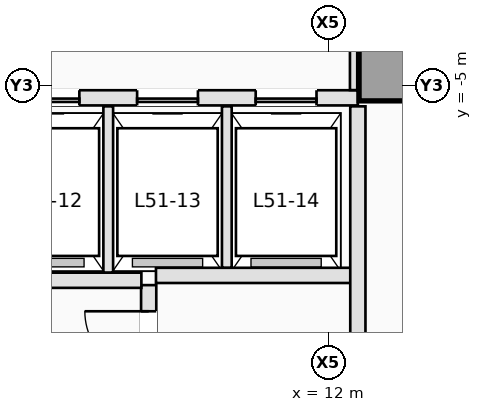
"""IFC4 building model, lengths in metres.
Left out: names, types, materials, properties, quantities, classifications, styles, units other than length and angle.
Written with IfcOpenShell. Run it as: python <this file> out.ifc"""

import sys

from ifc_helpers import new_model, si_unit, direction, frame, frame_2d, origin, origin_2d, place, context, subcontext, project, spatial, rectangle, extrude, element, fill, save


model = new_model("IFC4")
c1 = context("Model", 3, precision=1e-05, world=origin(), true_north=direction((0.0, 1.0)))
c2 = subcontext(c1, "Body", "Model", "MODEL_VIEW")
j1 = project(units=[si_unit("LENGTHUNIT", "METRE"), si_unit("PLANEANGLEUNIT", "RADIAN")], contexts=[c1])
p1 = place(None, origin())
s1 = spatial("IfcSite", under=j1, at=p1, CompositionType="ELEMENT")
p2 = place(p1, origin())
s2 = spatial("IfcBuilding", under=s1, at=p2, CompositionType="ELEMENT")
p3 = place(p2, frame((0.0, 0.0, 186.9)))
s3 = spatial("IfcBuildingStorey", under=s2, at=p3, CompositionType="ELEMENT", Elevation=186.9)
p4 = place(p3, frame((12.95, -4.8, 0.0), z_axis=(0.0, 0.0, 1.0), x_axis=(1.0, 0.0, 0.0)))
e1 = element("IfcColumn", 1, at=p4, inside=s3, PredefinedType="COLUMN", context=c2, shape_type="SweptSolid", body=[
    extrude(rectangle(XDim=0.9, YDim=0.9, at=origin_2d()), origin(), (0.0, 0.0, 1.0), 3.5),
])
p5 = place(p3, frame((9.04, -10.18, 0.0), z_axis=(0.0, 0.0, 1.0), x_axis=(0.0, 1.0, 0.0)))
e2 = element("IfcWall", 2, at=p5, inside=s3, PredefinedType="PARTITIONING", context=c2, shape_type="SweptSolid", body=[
    extrude(rectangle(XDim=1.9, YDim=0.25, at=frame_2d((0.95, 0.0))), origin(), (0.0, 0.0, 1.0), 3.25),
])
p6 = place(p5, frame((0.42, 0.0, 0.0)))
e3 = element("IfcOpeningElement", 3, at=p6, cuts=e2, PredefinedType="OPENING", context=c2, shape_type="SweptSolid", body=[
    extrude(rectangle(XDim=1.05, YDim=2.15, at=frame_2d((0.525, 1.075))), frame((0.0, 0.135, 0.0), z_axis=(0.0, -1.0, 0.0), x_axis=(1.0, 0.0, 0.0)), (0.0, 0.0, 1.0), 0.27),
])
p7 = place(p3, frame((9.16, -8.12, 0.0), z_axis=(0.0, 0.0, 1.0), x_axis=(1.0, 0.0, 0.0)))
e4 = element("IfcWall", 4, at=p7, inside=s3, PredefinedType="PARTITIONING", context=c2, shape_type="SweptSolid", body=[
    extrude(rectangle(XDim=3.22, YDim=0.25, at=frame_2d((1.61, 0.0))), origin(), (0.0, 0.0, 1.0), 3.25),
])
p8 = place(p3, frame((12.48, -10.18, 0.0), z_axis=(0.0, 0.0, 1.0), x_axis=(0.0, 1.0, 0.0)))
e5 = element("IfcWall", 5, at=p8, inside=s3, PredefinedType="PARTITIONING", context=c2, shape_type="SweptSolid", body=[
    extrude(rectangle(XDim=4.84, YDim=0.25, at=frame_2d((2.42, 0.0))), origin(), (0.0, 0.0, 1.0), 3.25),
])
p9 = place(p3, frame((3.68, -8.2, 0.0), z_axis=(0.0, 0.0, 1.0), x_axis=(1.0, 0.0, 0.0)))
e6 = element("IfcWall", 6, at=p9, inside=s3, PredefinedType="PARTITIONING", context=c2, shape_type="SweptSolid", body=[
    extrude(rectangle(XDim=5.24, YDim=0.25, at=frame_2d((2.62, 0.0))), origin(), (0.0, 0.0, 1.0), 3.25),
])
p10 = place(p3, frame((4.202, -5.2, 0.0), z_axis=(0.0, 0.0, 1.0), x_axis=(1.0, 0.0, 0.0)))
e7 = element("IfcWall", 7, at=p10, inside=s3, PredefinedType="PARTITIONING", context=c2, shape_type="SweptSolid", body=[
    extrude(rectangle(XDim=8.278, YDim=0.25, at=frame_2d((4.139, 0.0))), origin(), (0.0, 0.0, 1.0), 3.25),
])
p11 = place(p10, frame((0.748, 0.0, 0.0)))
e8 = element("IfcOpeningElement", 8, at=p11, cuts=e7, PredefinedType="OPENING", context=c2, shape_type="SweptSolid", body=[
    extrude(rectangle(XDim=1.0, YDim=2.15, at=frame_2d((0.5, 1.075))), frame((0.0, 0.135, 0.0), z_axis=(0.0, -1.0, 0.0), x_axis=(1.0, 0.0, 0.0)), (0.0, 0.0, 1.0), 0.27),
])
p12 = place(p10, frame((2.698, 0.0, 0.0)))
e9 = element("IfcOpeningElement", 9, at=p12, cuts=e7, PredefinedType="OPENING", context=c2, shape_type="SweptSolid", body=[
    extrude(rectangle(XDim=1.0, YDim=2.15, at=frame_2d((0.5, 1.075))), frame((0.0, 0.135, 0.0), z_axis=(0.0, -1.0, 0.0), x_axis=(1.0, 0.0, 0.0)), (0.0, 0.0, 1.0), 0.27),
])
p13 = place(p10, frame((4.648, 0.0, 0.0)))
e10 = element("IfcOpeningElement", 10, at=p13, cuts=e7, PredefinedType="OPENING", context=c2, shape_type="SweptSolid", body=[
    extrude(rectangle(XDim=1.0, YDim=2.15, at=frame_2d((0.5, 1.075))), frame((0.0, 0.135, 0.0), z_axis=(0.0, -1.0, 0.0), x_axis=(1.0, 0.0, 0.0)), (0.0, 0.0, 1.0), 0.27),
])
p14 = place(p10, frame((6.598, 0.0, 0.0)))
e11 = element("IfcOpeningElement", 11, at=p14, cuts=e7, PredefinedType="OPENING", context=c2, shape_type="SweptSolid", body=[
    extrude(rectangle(XDim=1.0, YDim=2.15, at=frame_2d((0.5, 1.075))), frame((0.0, 0.135, 0.0), z_axis=(0.0, -1.0, 0.0), x_axis=(1.0, 0.0, 0.0)), (0.0, 0.0, 1.0), 0.27),
])
p15 = place(p3, frame((8.375, -8.073, 0.0), z_axis=(0.0, 0.0, 1.0), x_axis=(0.0, 1.0, 0.0)))
e12 = element("IfcWall", 12, at=p15, inside=s3, PredefinedType="PARTITIONING", context=c2, shape_type="SweptSolid", body=[
    extrude(rectangle(XDim=2.733, YDim=0.16, at=frame_2d((1.366, 0.0))), origin(), (0.0, 0.0, 1.0), 3.25),
])
p16 = place(p3, frame((10.325, -7.993, 0.0), z_axis=(0.0, 0.0, 1.0), x_axis=(0.0, 1.0, 0.0)))
e13 = element("IfcWall", 13, at=p16, inside=s3, PredefinedType="PARTITIONING", context=c2, shape_type="SweptSolid", body=[
    extrude(rectangle(XDim=2.653, YDim=0.16, at=frame_2d((1.326, 0.0))), origin(), (0.0, 0.0, 1.0), 3.25),
])
p17 = place(p3, frame((12.41, -2.462, 0.0), z_axis=(0.0, 0.0, 1.0), x_axis=(0.0, -1.0, 0.0)))
e14 = element("IfcWall", 14, at=p17, inside=s3, PredefinedType="PARTITIONING", context=c2, shape_type="SweptSolid", body=[
    extrude(rectangle(XDim=2.611, YDim=0.12, at=frame_2d((1.306, 0.0))), origin(), (0.0, 0.0, 1.0), 3.25),
])
p18 = place(p12, origin())
e15 = element("IfcDoor", 15, at=p18, inside=s3, OperationType="SLIDING_TO_RIGHT", PredefinedType="DOOR", context=c2, shape_type="SweptSolid", body=[
    extrude(rectangle(XDim=1.0, YDim=2.15, at=frame_2d((0.5, 1.075))), frame((0.0, 0.025, 0.0), z_axis=(0.0, -1.0, 0.0), x_axis=(1.0, 0.0, 0.0)), (0.0, 0.0, 1.0), 0.05),
])
fill(e9, e15)
p19 = place(p13, origin())
e16 = element("IfcDoor", 16, at=p19, inside=s3, OperationType="SLIDING_TO_RIGHT", PredefinedType="DOOR", context=c2, shape_type="SweptSolid", body=[
    extrude(rectangle(XDim=1.0, YDim=2.15, at=frame_2d((0.5, 1.075))), frame((0.0, 0.025, 0.0), z_axis=(0.0, -1.0, 0.0), x_axis=(1.0, 0.0, 0.0)), (0.0, 0.0, 1.0), 0.05),
])
fill(e10, e16)
p20 = place(p14, origin())
e17 = element("IfcDoor", 17, at=p20, inside=s3, OperationType="SLIDING_TO_RIGHT", PredefinedType="DOOR", context=c2, shape_type="SweptSolid", body=[
    extrude(rectangle(XDim=1.0, YDim=2.15, at=frame_2d((0.5, 1.075))), frame((0.0, 0.025, 0.0), z_axis=(0.0, -1.0, 0.0), x_axis=(1.0, 0.0, 0.0)), (0.0, 0.0, 1.0), 0.05),
])
fill(e11, e17)
p21 = place(p6, origin())
e18 = element("IfcDoor", 18, at=p21, inside=s3, OperationType="SINGLE_SWING_RIGHT", PredefinedType="DOOR", context=c2, shape_type="SweptSolid", body=[
    extrude(rectangle(XDim=1.05, YDim=2.15, at=frame_2d((0.525, 1.075))), frame((0.0, 0.025, 0.0), z_axis=(0.0, -1.0, 0.0), x_axis=(1.0, 0.0, 0.0)), (0.0, 0.0, 1.0), 0.05),
])
fill(e3, e18)
save(model, sys.argv[1])
